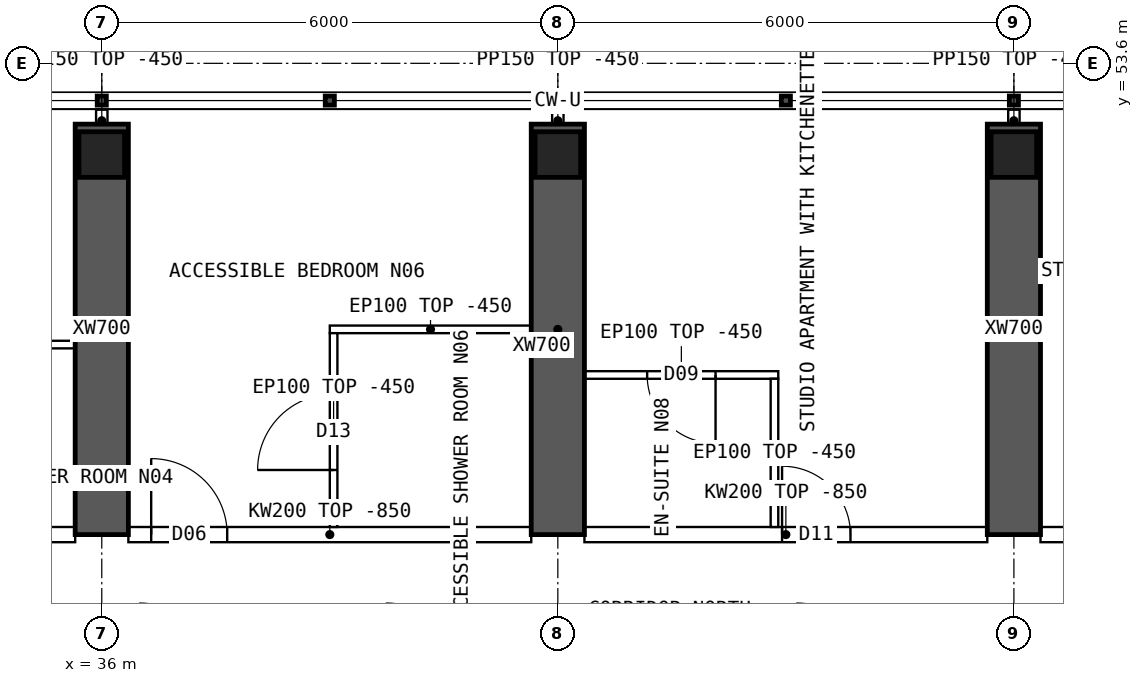
"""IFC4 building model, lengths in metres.
Left out: names, types, materials, properties, quantities, classifications, styles, units other than length and angle.
Written with IfcOpenShell. Run it as: python <this file> out.ifc"""

import sys

from ifc_helpers import new_model, si_unit, direction, frame, frame_2d, origin, origin_2d, place, context, subcontext, project, spatial, polyline, rectangle, hollow_rectangle, outline, extrude, element, fill, save


model = new_model("IFC4")
c1 = context("Model", 3, precision=1e-05, world=origin(), true_north=direction((0.0, 1.0)))
c2 = subcontext(c1, "Body", "Model", "MODEL_VIEW")
j1 = project(units=[si_unit("LENGTHUNIT", "METRE"), si_unit("PLANEANGLEUNIT", "RADIAN")], contexts=[c1])
p1 = place(None, origin())
s1 = spatial("IfcSite", under=j1, at=p1, CompositionType="ELEMENT")
p2 = place(p1, origin())
s2 = spatial("IfcBuilding", under=s1, at=p2, CompositionType="ELEMENT")
p3 = place(p2, frame((0.0, 0.0, 227.8)))
s3 = spatial("IfcBuildingStorey", under=s2, at=p3, CompositionType="ELEMENT", Elevation=227.8)
for number, where, z_axis, x_axis in (
    (1, (36.0, 52.4, 0.0), (0.0, 0.0, 1.0), (1.0, 0.0, 0.0)),
    (2, (42.0, 52.4, 0.0), (0.0, 0.0, 1.0), (1.0, 0.0, 0.0)),
    (3, (48.0, 52.4, 0.0), (0.0, 0.0, 1.0), (1.0, 0.0, 0.0)),
):
    element("IfcColumn", number, at=place(p3, frame(where, z_axis=z_axis, x_axis=x_axis)), inside=s3, PredefinedType="COLUMN", context=c2, shape_type="SweptSolid", body=[
        extrude(hollow_rectangle(XDim=0.6, YDim=0.6, WallThickness=0.06, at=origin_2d()), origin(), (0.0, 0.0, 1.0), 3.75),
    ])
for number, where, z_axis, x_axis in (
    (4, (36.0, 47.4, 0.0), (0.0, 0.0, 1.0), (0.0, 1.0, 0.0)),
    (5, (42.0, 47.4, 0.0), (0.0, 0.0, 1.0), (0.0, 1.0, 0.0)),
    (6, (48.0, 47.4, 0.0), (0.0, 0.0, 1.0), (0.0, 1.0, 0.0)),
):
    element("IfcWall", number, at=place(p3, frame(where, z_axis=z_axis, x_axis=x_axis)), inside=s3, PredefinedType="SHEAR", context=c2, shape_type="SweptSolid", body=[
        extrude(rectangle(XDim=5.4, YDim=0.7, at=frame_2d((2.7, 0.0))), origin(), (0.0, 0.0, 1.0), 3.75),
    ])
p4 = place(p3, frame((30.35, 47.4, 0.0), z_axis=(0.0, 0.0, 1.0), x_axis=(1.0, 0.0, 0.0)))
e7 = element("IfcWall", 7, at=p4, inside=s3, PredefinedType="SOLIDWALL", context=c2, shape_type="SweptSolid", body=[
    extrude(outline(polyline([(0.0, 0.0), (5.3, 0.0), (5.3, 2.9), (0.0, 2.9), (0.0, 0.0)])), frame((0.0, 0.1, 0.0), z_axis=(0.0, -1.0, 0.0), x_axis=(1.0, 0.0, 0.0)), (0.0, 0.0, 1.0), 0.2),
])
p5 = place(p4, frame((2.3, 0.0, 0.0)))
e8 = element("IfcOpeningElement", 8, at=p5, cuts=e7, PredefinedType="OPENING", context=c2, shape_type="SweptSolid", body=[
    extrude(rectangle(XDim=0.9, YDim=2.1, at=frame_2d((0.45, 1.05))), frame((0.0, 0.11, 0.0), z_axis=(0.0, -1.0, 0.0), x_axis=(1.0, 0.0, 0.0)), (0.0, 0.0, 1.0), 0.22),
])
p6 = place(p3, frame((36.35, 47.4, 0.0), z_axis=(0.0, 0.0, 1.0), x_axis=(1.0, 0.0, 0.0)))
e9 = element("IfcWall", 9, at=p6, inside=s3, PredefinedType="SOLIDWALL", context=c2, shape_type="SweptSolid", body=[
    extrude(outline(polyline([(0.0, 0.0), (5.3, 0.0), (5.3, 2.9), (0.0, 2.9), (0.0, 0.0)])), frame((0.0, 0.1, 0.0), z_axis=(0.0, -1.0, 0.0), x_axis=(1.0, 0.0, 0.0)), (0.0, 0.0, 1.0), 0.2),
])
p7 = place(p6, frame((0.3, 0.0, 0.0)))
e10 = element("IfcOpeningElement", 10, at=p7, cuts=e9, PredefinedType="OPENING", context=c2, shape_type="SweptSolid", body=[
    extrude(rectangle(XDim=1.0, YDim=2.1, at=frame_2d((0.5, 1.05))), frame((0.0, 0.11, 0.0), z_axis=(0.0, -1.0, 0.0), x_axis=(1.0, 0.0, 0.0)), (0.0, 0.0, 1.0), 0.22),
])
p8 = place(p3, frame((42.35, 47.4, 0.0), z_axis=(0.0, 0.0, 1.0), x_axis=(1.0, 0.0, 0.0)))
e11 = element("IfcWall", 11, at=p8, inside=s3, PredefinedType="SOLIDWALL", context=c2, shape_type="SweptSolid", body=[
    extrude(outline(polyline([(0.0, 0.0), (5.3, 0.0), (5.3, 2.9), (0.0, 2.9), (0.0, 0.0)])), frame((0.0, 0.1, 0.0), z_axis=(0.0, -1.0, 0.0), x_axis=(1.0, 0.0, 0.0)), (0.0, 0.0, 1.0), 0.2),
])
p9 = place(p8, frame((2.6, 0.0, 0.0)))
e12 = element("IfcOpeningElement", 12, at=p9, cuts=e11, PredefinedType="OPENING", context=c2, shape_type="SweptSolid", body=[
    extrude(rectangle(XDim=0.9, YDim=2.1, at=frame_2d((0.45, 1.05))), frame((0.0, 0.11, 0.0), z_axis=(0.0, -1.0, 0.0), x_axis=(1.0, 0.0, 0.0)), (0.0, 0.0, 1.0), 0.22),
])
p10 = place(p3, frame((48.35, 47.4, 0.0), z_axis=(0.0, 0.0, 1.0), x_axis=(1.0, 0.0, 0.0)))
e13 = element("IfcWall", 13, at=p10, inside=s3, PredefinedType="SOLIDWALL", context=c2, shape_type="SweptSolid", body=[
    extrude(outline(polyline([(0.0, 0.0), (5.3, 0.0), (5.3, 2.9), (0.0, 2.9), (0.0, 0.0)])), frame((0.0, 0.1, 0.0), z_axis=(0.0, -1.0, 0.0), x_axis=(1.0, 0.0, 0.0)), (0.0, 0.0, 1.0), 0.2),
])
p11 = place(p10, frame((2.3, 0.0, 0.0)))
e14 = element("IfcOpeningElement", 14, at=p11, cuts=e13, PredefinedType="OPENING", context=c2, shape_type="SweptSolid", body=[
    extrude(rectangle(XDim=0.9, YDim=2.1, at=frame_2d((0.45, 1.05))), frame((0.0, 0.11, 0.0), z_axis=(0.0, -1.0, 0.0), x_axis=(1.0, 0.0, 0.0)), (0.0, 0.0, 1.0), 0.22),
])
p12 = place(p3, frame((32.5, 49.9, 0.0), z_axis=(0.0, 0.0, 1.0), x_axis=(1.0, 0.0, 0.0)))
e15 = element("IfcWall", 15, at=p12, inside=s3, PredefinedType="PARTITIONING", context=c2, shape_type="SweptSolid", body=[
    extrude(rectangle(XDim=3.15, YDim=0.1, at=frame_2d((1.575, 0.0))), origin(), (0.0, 0.0, 1.0), 3.3),
])
p13 = place(p12, frame((0.25, 0.0, 0.0)))
e16 = element("IfcOpeningElement", 16, at=p13, cuts=e15, PredefinedType="OPENING", context=c2, shape_type="SweptSolid", body=[
    extrude(rectangle(XDim=0.8, YDim=2.1, at=frame_2d((0.4, 1.05))), frame((0.0, 0.06, 0.0), z_axis=(0.0, -1.0, 0.0), x_axis=(1.0, 0.0, 0.0)), (0.0, 0.0, 1.0), 0.12),
])
p14 = place(p3, frame((39.0, 50.1, 0.0), z_axis=(0.0, 0.0, 1.0), x_axis=(1.0, 0.0, 0.0)))
e17 = element("IfcWall", 17, at=p14, inside=s3, PredefinedType="PARTITIONING", context=c2, shape_type="SweptSolid", body=[
    extrude(rectangle(XDim=2.65, YDim=0.1, at=frame_2d((1.325, 0.0))), origin(), (0.0, 0.0, 1.0), 3.3),
])
p15 = place(p3, frame((39.05, 50.05, 0.0), z_axis=(0.0, 0.0, 1.0), x_axis=(0.0, -1.0, 0.0)))
e18 = element("IfcWall", 18, at=p15, inside=s3, PredefinedType="PARTITIONING", context=c2, shape_type="SweptSolid", body=[
    extrude(outline(polyline([(0.0, 0.0), (2.55, 0.0), (2.55, 2.9), (2.502, 2.9), (2.5, 3.3), (0.0, 3.3), (0.0, 0.0)])), frame((0.0, 0.05, 0.0), z_axis=(0.0, -1.0, 0.0), x_axis=(1.0, 0.0, 0.0)), (0.0, 0.0, 1.0), 0.1),
])
p16 = place(p15, frame((0.8, 0.0, 0.0)))
e19 = element("IfcOpeningElement", 19, at=p16, cuts=e18, PredefinedType="OPENING", context=c2, shape_type="SweptSolid", body=[
    extrude(rectangle(XDim=1.0, YDim=2.1, at=frame_2d((0.5, 1.05))), frame((0.0, 0.06, 0.0), z_axis=(0.0, -1.0, 0.0), x_axis=(1.0, 0.0, 0.0)), (0.0, 0.0, 1.0), 0.12),
])
p17 = place(p3, frame((42.35, 49.5, 0.0), z_axis=(0.0, 0.0, 1.0), x_axis=(1.0, 0.0, 0.0)))
e20 = element("IfcWall", 20, at=p17, inside=s3, PredefinedType="PARTITIONING", context=c2, shape_type="SweptSolid", body=[
    extrude(rectangle(XDim=2.55, YDim=0.1, at=frame_2d((1.275, 0.0))), origin(), (0.0, 0.0, 1.0), 3.3),
])
p18 = place(p17, frame((0.825, 0.0, 0.0)))
e21 = element("IfcOpeningElement", 21, at=p18, cuts=e20, PredefinedType="OPENING", context=c2, shape_type="SweptSolid", body=[
    extrude(rectangle(XDim=0.9, YDim=2.1, at=frame_2d((0.45, 1.05))), frame((0.0, 0.06, 0.0), z_axis=(0.0, -1.0, 0.0), x_axis=(1.0, 0.0, 0.0)), (0.0, 0.0, 1.0), 0.12),
])
p19 = place(p3, frame((44.85, 49.45, 0.0), z_axis=(0.0, 0.0, 1.0), x_axis=(0.0, -1.0, 0.0)))
e22 = element("IfcWall", 22, at=p19, inside=s3, PredefinedType="PARTITIONING", context=c2, shape_type="SweptSolid", body=[
    extrude(outline(polyline([(0.0, 0.0), (1.95, 0.0), (1.95, 2.9), (1.902, 2.9), (1.9, 3.3), (0.0, 3.3), (0.0, 0.0)])), frame((0.0, 0.05, 0.0), z_axis=(0.0, -1.0, 0.0), x_axis=(1.0, 0.0, 0.0)), (0.0, 0.0, 1.0), 0.1),
])
for number, where, z_axis, x_axis in (
    (23, (36.0, 52.7, 0.0), (0.0, 0.0, 1.0), (0.0, 1.0, 0.0)),
    (24, (42.0, 52.7, 0.0), (0.0, 0.0, 1.0), (0.0, 1.0, 0.0)),
    (25, (48.0, 52.7, 0.0), (0.0, 0.0, 1.0), (0.0, 1.0, 0.0)),
):
    element("IfcWall", number, at=place(p3, frame(where, z_axis=z_axis, x_axis=x_axis)), inside=s3, PredefinedType="PARTITIONING", context=c2, shape_type="SweptSolid", body=[
        extrude(rectangle(XDim=0.29, YDim=0.15, at=frame_2d((0.145, 0.0))), origin(), (0.0, 0.0, 1.0), 3.3),
    ])
p20 = place(p16, origin())
e26 = element("IfcDoor", 26, at=p20, inside=s3, OperationType="SINGLE_SWING_RIGHT", PredefinedType="DOOR", context=c2, shape_type="SweptSolid", body=[
    extrude(rectangle(XDim=1.0, YDim=2.1, at=frame_2d((0.5, 1.05))), frame((0.0, 0.025, 0.0), z_axis=(0.0, -1.0, 0.0), x_axis=(1.0, 0.0, 0.0)), (0.0, 0.0, 1.0), 0.05),
])
fill(e19, e26)
p21 = place(p7, origin())
e27 = element("IfcDoor", 27, at=p21, inside=s3, OperationType="SINGLE_SWING_LEFT", PredefinedType="DOOR", context=c2, shape_type="SweptSolid", body=[
    extrude(rectangle(XDim=1.0, YDim=2.1, at=frame_2d((0.5, 1.05))), frame((0.0, 0.025, 0.0), z_axis=(0.0, -1.0, 0.0), x_axis=(1.0, 0.0, 0.0)), (0.0, 0.0, 1.0), 0.05),
])
fill(e10, e27)
p22 = place(p18, origin())
e28 = element("IfcDoor", 28, at=p22, inside=s3, OperationType="SINGLE_SWING_RIGHT", PredefinedType="DOOR", context=c2, shape_type="SweptSolid", body=[
    extrude(rectangle(XDim=0.9, YDim=2.1, at=frame_2d((0.45, 1.05))), frame((0.0, 0.025, 0.0), z_axis=(0.0, -1.0, 0.0), x_axis=(1.0, 0.0, 0.0)), (0.0, 0.0, 1.0), 0.05),
])
fill(e21, e28)
p23 = place(p9, origin())
e29 = element("IfcDoor", 29, at=p23, inside=s3, OperationType="SINGLE_SWING_LEFT", PredefinedType="DOOR", context=c2, shape_type="SweptSolid", body=[
    extrude(rectangle(XDim=0.9, YDim=2.1, at=frame_2d((0.45, 1.05))), frame((0.0, 0.025, 0.0), z_axis=(0.0, -1.0, 0.0), x_axis=(1.0, 0.0, 0.0)), (0.0, 0.0, 1.0), 0.05),
])
fill(e12, e29)
save(model, sys.argv[1])
